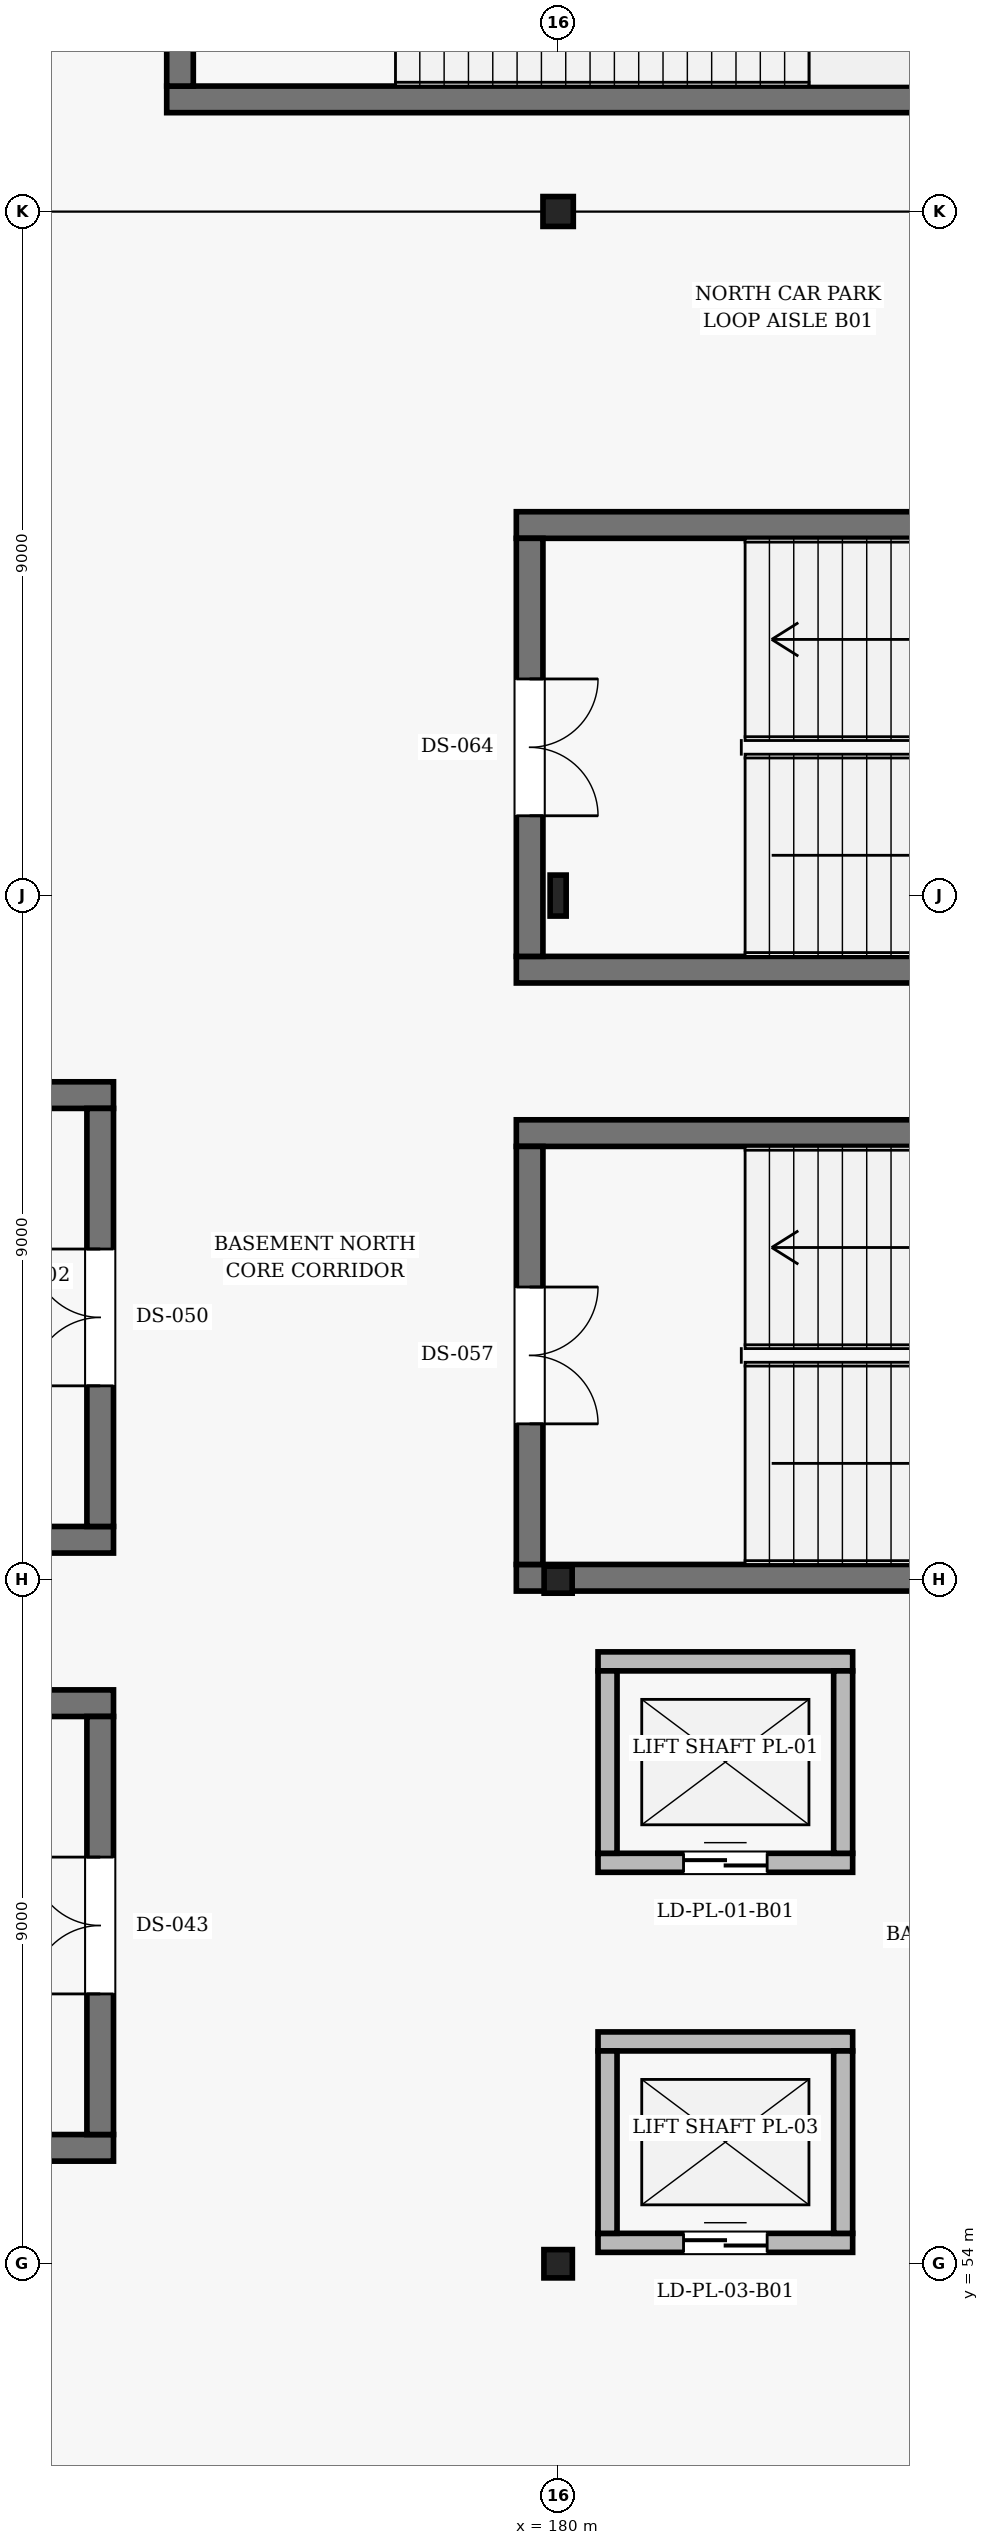
"""IFC4 building model, lengths in metres.
Left out: names, types, materials, properties, quantities, classifications, styles, units other than length and angle.
Written with IfcOpenShell. Run it as: python <this file> out.ifc"""

import sys

from ifc_helpers import new_model, si_unit, direction, frame, frame_2d, origin, origin_2d, place, context, subcontext, project, spatial, rectangle, i_section, extrude, element, fill, save


model = new_model("IFC4")
c1 = context("Model", 3, precision=1e-05, world=origin(), true_north=direction((0.0, 1.0)))
c2 = subcontext(c1, "Body", "Model", "MODEL_VIEW")
j1 = project(units=[si_unit("LENGTHUNIT", "METRE"), si_unit("PLANEANGLEUNIT", "RADIAN")], contexts=[c1])
p1 = place(None, origin())
s1 = spatial("IfcSite", under=j1, at=p1, CompositionType="ELEMENT")
p2 = place(p1, origin())
s2 = spatial("IfcBuilding", under=s1, at=p2, CompositionType="ELEMENT")
p3 = place(p2, frame((0.0, 0.0, -5.4)))
s3 = spatial("IfcBuildingStorey", under=s2, at=p3, CompositionType="ELEMENT", Elevation=-5.4)
p4 = place(p3, frame((180.0, 54.0, 0.0), z_axis=(0.0, 0.0, 1.0), x_axis=(1.0, 0.0, 0.0)))
e1 = element("IfcColumn", 1, at=p4, inside=s3, PredefinedType="COLUMN", context=c2, shape_type="SweptSolid", body=[
    extrude(i_section(OverallWidth=0.374, OverallDepth=0.372, WebThickness=0.016, FlangeThickness=0.026, FilletRadius=0.016, at=origin_2d()), origin(), (0.0, 0.0, 1.0), 5.4),
])
p5 = place(p3, frame((180.0, 63.0, 0.0), z_axis=(0.0, 0.0, 1.0), x_axis=(1.0, 0.0, 0.0)))
e2 = element("IfcColumn", 2, at=p5, inside=s3, PredefinedType="COLUMN", context=c2, shape_type="SweptSolid", body=[
    extrude(i_section(OverallWidth=0.369, OverallDepth=0.356, WebThickness=0.011, FlangeThickness=0.018, FilletRadius=0.015, at=origin_2d()), origin(), (0.0, 0.0, 1.0), 5.4),
])
p6 = place(p3, frame((180.0, 72.0, 0.0), z_axis=(0.0, 0.0, 1.0), x_axis=(1.0, 0.0, 0.0)))
e3 = element("IfcColumn", 3, at=p6, inside=s3, PredefinedType="COLUMN", context=c2, shape_type="SweptSolid", body=[
    extrude(i_section(OverallWidth=0.211, OverallDepth=0.539, WebThickness=0.012, FlangeThickness=0.019, FilletRadius=0.014, at=origin_2d()), origin(), (0.0, 0.0, 1.0), 5.4),
])
p7 = place(p3, frame((180.0, 81.0, 0.0), z_axis=(0.0, 0.0, 1.0), x_axis=(1.0, 0.0, 0.0)))
e4 = element("IfcColumn", 4, at=p7, inside=s3, PredefinedType="COLUMN", context=c2, shape_type="SweptSolid", body=[
    extrude(i_section(OverallWidth=0.399, OverallDepth=0.393, WebThickness=0.023, FlangeThickness=0.037, FilletRadius=0.018, at=origin_2d()), origin(), (0.0, 0.0, 1.0), 5.4),
])
for number, where, z_axis, x_axis in (
    (5, (162.05, 55.525, 0.0), (0.0, 0.0, 1.0), (1.0, 0.0, 0.0)),
    (6, (174.15, 61.375, 0.0), (0.0, 0.0, 1.0), (-1.0, 0.0, 0.0)),
):
    element("IfcWall", number, at=place(p3, frame(where, z_axis=z_axis, x_axis=x_axis)), inside=s3, PredefinedType="SHEAR", context=c2, shape_type="SweptSolid", body=[
        extrude(rectangle(XDim=12.1, YDim=0.35, at=frame_2d((6.05, 0.0))), origin(), (0.0, 0.0, 1.0), 5.14),
    ])
p8 = place(p3, frame((173.975, 55.7, 0.0), z_axis=(0.0, 0.0, 1.0), x_axis=(0.0, 1.0, 0.0)))
e7 = element("IfcWall", 7, at=p8, inside=s3, PredefinedType="SHEAR", context=c2, shape_type="SweptSolid", body=[
    extrude(rectangle(XDim=5.5, YDim=0.35, at=frame_2d((2.75, 0.0))), origin(), (0.0, 0.0, 1.0), 5.14),
])
p9 = place(p8, frame((1.85, 0.0, 0.0)))
e8 = element("IfcOpeningElement", 8, at=p9, cuts=e7, PredefinedType="OPENING", context=c2, shape_type="SweptSolid", body=[
    extrude(rectangle(XDim=1.8, YDim=2.2, at=frame_2d((0.9, 1.1))), frame((0.0, 0.185, 0.0), z_axis=(0.0, -1.0, 0.0), x_axis=(1.0, 0.0, 0.0)), (0.0, 0.0, 1.0), 0.37),
])
for number, where, z_axis, x_axis in (
    (9, (162.05, 63.525, 0.0), (0.0, 0.0, 1.0), (1.0, 0.0, 0.0)),
    (10, (174.15, 69.375, 0.0), (0.0, 0.0, 1.0), (-1.0, 0.0, 0.0)),
):
    element("IfcWall", number, at=place(p3, frame(where, z_axis=z_axis, x_axis=x_axis)), inside=s3, PredefinedType="SHEAR", context=c2, shape_type="SweptSolid", body=[
        extrude(rectangle(XDim=12.1, YDim=0.35, at=frame_2d((6.05, 0.0))), origin(), (0.0, 0.0, 1.0), 5.14),
    ])
p10 = place(p3, frame((173.975, 63.7, 0.0), z_axis=(0.0, 0.0, 1.0), x_axis=(0.0, 1.0, 0.0)))
e11 = element("IfcWall", 11, at=p10, inside=s3, PredefinedType="SHEAR", context=c2, shape_type="SweptSolid", body=[
    extrude(rectangle(XDim=5.5, YDim=0.35, at=frame_2d((2.75, 0.0))), origin(), (0.0, 0.0, 1.0), 5.14),
])
p11 = place(p10, frame((1.85, 0.0, 0.0)))
e12 = element("IfcOpeningElement", 12, at=p11, cuts=e11, PredefinedType="OPENING", context=c2, shape_type="SweptSolid", body=[
    extrude(rectangle(XDim=1.8, YDim=2.2, at=frame_2d((0.9, 1.1))), frame((0.0, 0.185, 0.0), z_axis=(0.0, -1.0, 0.0), x_axis=(1.0, 0.0, 0.0)), (0.0, 0.0, 1.0), 0.37),
])
p12 = place(p3, frame((179.45, 63.025, 0.0), z_axis=(0.0, 0.0, 1.0), x_axis=(1.0, 0.0, 0.0)))
e13 = element("IfcWall", 13, at=p12, inside=s3, PredefinedType="SHEAR", context=c2, shape_type="SweptSolid", body=[
    extrude(rectangle(XDim=12.175, YDim=0.35, at=frame_2d((6.087, 0.0))), origin(), (0.0, 0.0, 1.0), 5.14),
])
p13 = place(p3, frame((191.55, 68.875, 0.0), z_axis=(0.0, 0.0, 1.0), x_axis=(-1.0, 0.0, 0.0)))
e14 = element("IfcWall", 14, at=p13, inside=s3, PredefinedType="SHEAR", context=c2, shape_type="SweptSolid", body=[
    extrude(rectangle(XDim=12.1, YDim=0.35, at=frame_2d((6.05, 0.0))), origin(), (0.0, 0.0, 1.0), 5.14),
])
p14 = place(p3, frame((179.625, 68.7, 0.0), z_axis=(0.0, 0.0, 1.0), x_axis=(0.0, -1.0, 0.0)))
e15 = element("IfcWall", 15, at=p14, inside=s3, PredefinedType="SHEAR", context=c2, shape_type="SweptSolid", body=[
    extrude(rectangle(XDim=5.5, YDim=0.35, at=frame_2d((2.75, 0.0))), origin(), (0.0, 0.0, 1.0), 5.14),
])
p15 = place(p14, frame((1.85, 0.0, 0.0)))
e16 = element("IfcOpeningElement", 16, at=p15, cuts=e15, PredefinedType="OPENING", context=c2, shape_type="SweptSolid", body=[
    extrude(rectangle(XDim=1.8, YDim=2.2, at=frame_2d((0.9, 1.1))), frame((0.0, 0.185, 0.0), z_axis=(0.0, -1.0, 0.0), x_axis=(1.0, 0.0, 0.0)), (0.0, 0.0, 1.0), 0.37),
])
for number, where, z_axis, x_axis in (
    (17, (179.45, 71.025, 0.0), (0.0, 0.0, 1.0), (1.0, 0.0, 0.0)),
    (18, (191.55, 76.875, 0.0), (0.0, 0.0, 1.0), (-1.0, 0.0, 0.0)),
):
    element("IfcWall", number, at=place(p3, frame(where, z_axis=z_axis, x_axis=x_axis)), inside=s3, PredefinedType="SHEAR", context=c2, shape_type="SweptSolid", body=[
        extrude(rectangle(XDim=12.1, YDim=0.35, at=frame_2d((6.05, 0.0))), origin(), (0.0, 0.0, 1.0), 5.14),
    ])
p16 = place(p3, frame((179.625, 76.7, 0.0), z_axis=(0.0, 0.0, 1.0), x_axis=(0.0, -1.0, 0.0)))
e19 = element("IfcWall", 19, at=p16, inside=s3, PredefinedType="SHEAR", context=c2, shape_type="SweptSolid", body=[
    extrude(rectangle(XDim=5.5, YDim=0.35, at=frame_2d((2.75, 0.0))), origin(), (0.0, 0.0, 1.0), 5.14),
])
p17 = place(p16, frame((1.85, 0.0, 0.0)))
e20 = element("IfcOpeningElement", 20, at=p17, cuts=e19, PredefinedType="OPENING", context=c2, shape_type="SweptSolid", body=[
    extrude(rectangle(XDim=1.8, YDim=2.2, at=frame_2d((0.9, 1.1))), frame((0.0, 0.185, 0.0), z_axis=(0.0, -1.0, 0.0), x_axis=(1.0, 0.0, 0.0)), (0.0, 0.0, 1.0), 0.37),
])
p18 = place(p3, frame((174.85, 82.475, 0.0), z_axis=(0.0, 0.0, 1.0), x_axis=(1.0, 0.0, 0.0)))
e21 = element("IfcWall", 21, at=p18, inside=s3, PredefinedType="SHEAR", context=c2, shape_type="SweptSolid", body=[
    extrude(rectangle(XDim=12.1, YDim=0.35, at=frame_2d((6.05, 0.0))), origin(), (0.0, 0.0, 1.0), 5.12),
])
p19 = place(p3, frame((175.025, 88.15, 0.0), z_axis=(0.0, 0.0, 1.0), x_axis=(0.0, -1.0, 0.0)))
e22 = element("IfcWall", 22, at=p19, inside=s3, PredefinedType="SHEAR", context=c2, shape_type="SweptSolid", body=[
    extrude(rectangle(XDim=5.5, YDim=0.35, at=frame_2d((2.75, 0.0))), origin(), (0.0, 0.0, 1.0), 5.12),
])
p20 = place(p19, frame((1.85, 0.0, 0.0)))
e23 = element("IfcOpeningElement", 23, at=p20, cuts=e22, PredefinedType="OPENING", context=c2, shape_type="SweptSolid", body=[
    extrude(rectangle(XDim=1.8, YDim=2.2, at=frame_2d((0.9, 1.1))), frame((0.0, 0.185, 0.0), z_axis=(0.0, -1.0, 0.0), x_axis=(1.0, 0.0, 0.0)), (0.0, 0.0, 1.0), 0.37),
])
p21 = place(p3, frame((180.525, 59.275, 0.0), z_axis=(0.0, 0.0, 1.0), x_axis=(1.0, 0.0, 0.0)))
e24 = element("IfcWall", 24, at=p21, inside=s3, PredefinedType="SOLIDWALL", context=c2, shape_type="SweptSolid", body=[
    extrude(rectangle(XDim=3.35, YDim=0.25, at=frame_2d((1.675, 0.0))), origin(), (0.0, 0.0, 1.0), 5.1),
])
p22 = place(p21, frame((1.125, 0.0, 0.0)))
e25 = element("IfcOpeningElement", 25, at=p22, cuts=e24, PredefinedType="OPENING", context=c2, shape_type="SweptSolid", body=[
    extrude(rectangle(XDim=1.1, YDim=2.2, at=frame_2d((0.55, 1.1))), frame((0.0, 0.135, 0.0), z_axis=(0.0, -1.0, 0.0), x_axis=(1.0, 0.0, 0.0)), (0.0, 0.0, 1.0), 0.27),
])
p23 = place(p3, frame((183.875, 61.925, 0.0), z_axis=(0.0, 0.0, 1.0), x_axis=(-1.0, 0.0, 0.0)))
e26 = element("IfcWall", 26, at=p23, inside=s3, PredefinedType="SOLIDWALL", context=c2, shape_type="SweptSolid", body=[
    extrude(rectangle(XDim=3.35, YDim=0.25, at=frame_2d((1.675, 0.0))), origin(), (0.0, 0.0, 1.0), 5.1),
])
for number, where, z_axis, x_axis in (
    (27, (180.65, 61.8, 0.0), (0.0, 0.0, 1.0), (0.0, -1.0, 0.0)),
    (28, (183.75, 59.4, 0.0), (0.0, 0.0, 1.0), (0.0, 1.0, 0.0)),
):
    element("IfcWall", number, at=place(p3, frame(where, z_axis=z_axis, x_axis=x_axis)), inside=s3, PredefinedType="SOLIDWALL", context=c2, shape_type="SweptSolid", body=[
        extrude(rectangle(XDim=2.4, YDim=0.25, at=frame_2d((1.2, 0.0))), origin(), (0.0, 0.0, 1.0), 5.1),
    ])
p24 = place(p3, frame((180.525, 54.275, 0.0), z_axis=(0.0, 0.0, 1.0), x_axis=(1.0, 0.0, 0.0)))
e29 = element("IfcWall", 29, at=p24, inside=s3, PredefinedType="SOLIDWALL", context=c2, shape_type="SweptSolid", body=[
    extrude(rectangle(XDim=3.35, YDim=0.25, at=frame_2d((1.675, 0.0))), origin(), (0.0, 0.0, 1.0), 4.421),
])
p25 = place(p24, frame((1.125, 0.0, 0.0)))
e30 = element("IfcOpeningElement", 30, at=p25, cuts=e29, PredefinedType="OPENING", context=c2, shape_type="SweptSolid", body=[
    extrude(rectangle(XDim=1.1, YDim=2.2, at=frame_2d((0.55, 1.1))), frame((0.0, 0.135, 0.0), z_axis=(0.0, -1.0, 0.0), x_axis=(1.0, 0.0, 0.0)), (0.0, 0.0, 1.0), 0.27),
])
p26 = place(p3, frame((183.875, 56.925, 0.0), z_axis=(0.0, 0.0, 1.0), x_axis=(-1.0, 0.0, 0.0)))
e31 = element("IfcWall", 31, at=p26, inside=s3, PredefinedType="SOLIDWALL", context=c2, shape_type="SweptSolid", body=[
    extrude(rectangle(XDim=3.35, YDim=0.25, at=frame_2d((1.675, 0.0))), origin(), (0.0, 0.0, 1.0), 4.718),
])
for number, where, z_axis, x_axis in (
    (32, (180.65, 56.8, 0.0), (0.0, 0.0, 1.0), (0.0, -1.0, 0.0)),
    (33, (183.75, 54.4, 0.0), (0.0, 0.0, 1.0), (0.0, 1.0, 0.0)),
):
    element("IfcWall", number, at=place(p3, frame(where, z_axis=z_axis, x_axis=x_axis)), inside=s3, PredefinedType="SOLIDWALL", context=c2, shape_type="SweptSolid", body=[
        extrude(rectangle(XDim=2.4, YDim=0.25, at=frame_2d((1.2, 0.0))), origin(), (0.0, 0.0, 1.0), 4.421),
    ])
p27 = place(p9, origin())
e34 = element("IfcDoor", 34, at=p27, inside=s3, OperationType="DOUBLE_DOOR_SINGLE_SWING", PredefinedType="DOOR", context=c2, shape_type="SweptSolid", body=[
    extrude(rectangle(XDim=1.8, YDim=2.2, at=frame_2d((0.9, 1.1))), frame((0.0, 0.025, 0.0), z_axis=(0.0, -1.0, 0.0), x_axis=(1.0, 0.0, 0.0)), (0.0, 0.0, 1.0), 0.05),
])
fill(e8, e34)
p28 = place(p11, origin())
e35 = element("IfcDoor", 35, at=p28, inside=s3, OperationType="DOUBLE_DOOR_SINGLE_SWING", PredefinedType="DOOR", context=c2, shape_type="SweptSolid", body=[
    extrude(rectangle(XDim=1.8, YDim=2.2, at=frame_2d((0.9, 1.1))), frame((0.0, 0.025, 0.0), z_axis=(0.0, -1.0, 0.0), x_axis=(1.0, 0.0, 0.0)), (0.0, 0.0, 1.0), 0.05),
])
fill(e12, e35)
p29 = place(p15, origin())
e36 = element("IfcDoor", 36, at=p29, inside=s3, OperationType="DOUBLE_DOOR_SINGLE_SWING", PredefinedType="DOOR", context=c2, shape_type="SweptSolid", body=[
    extrude(rectangle(XDim=1.8, YDim=2.2, at=frame_2d((0.9, 1.1))), frame((0.0, 0.025, 0.0), z_axis=(0.0, -1.0, 0.0), x_axis=(1.0, 0.0, 0.0)), (0.0, 0.0, 1.0), 0.05),
])
fill(e16, e36)
p30 = place(p17, origin())
e37 = element("IfcDoor", 37, at=p30, inside=s3, OperationType="DOUBLE_DOOR_SINGLE_SWING", PredefinedType="DOOR", context=c2, shape_type="SweptSolid", body=[
    extrude(rectangle(XDim=1.8, YDim=2.2, at=frame_2d((0.9, 1.1))), frame((0.0, 0.025, 0.0), z_axis=(0.0, -1.0, 0.0), x_axis=(1.0, 0.0, 0.0)), (0.0, 0.0, 1.0), 0.05),
])
fill(e20, e37)
p31 = place(p22, origin())
e38 = element("IfcDoor", 38, at=p31, inside=s3, OperationType="DOUBLE_DOOR_SLIDING", PredefinedType="DOOR", context=c2, shape_type="SweptSolid", body=[
    extrude(rectangle(XDim=1.1, YDim=2.2, at=frame_2d((0.55, 1.1))), frame((0.0, 0.025, 0.0), z_axis=(0.0, -1.0, 0.0), x_axis=(1.0, 0.0, 0.0)), (0.0, 0.0, 1.0), 0.05),
])
fill(e25, e38)
p32 = place(p25, origin())
e39 = element("IfcDoor", 39, at=p32, inside=s3, OperationType="DOUBLE_DOOR_SLIDING", PredefinedType="DOOR", context=c2, shape_type="SweptSolid", body=[
    extrude(rectangle(XDim=1.1, YDim=2.2, at=frame_2d((0.55, 1.1))), frame((0.0, 0.025, 0.0), z_axis=(0.0, -1.0, 0.0), x_axis=(1.0, 0.0, 0.0)), (0.0, 0.0, 1.0), 0.05),
])
fill(e30, e39)
save(model, sys.argv[1])
